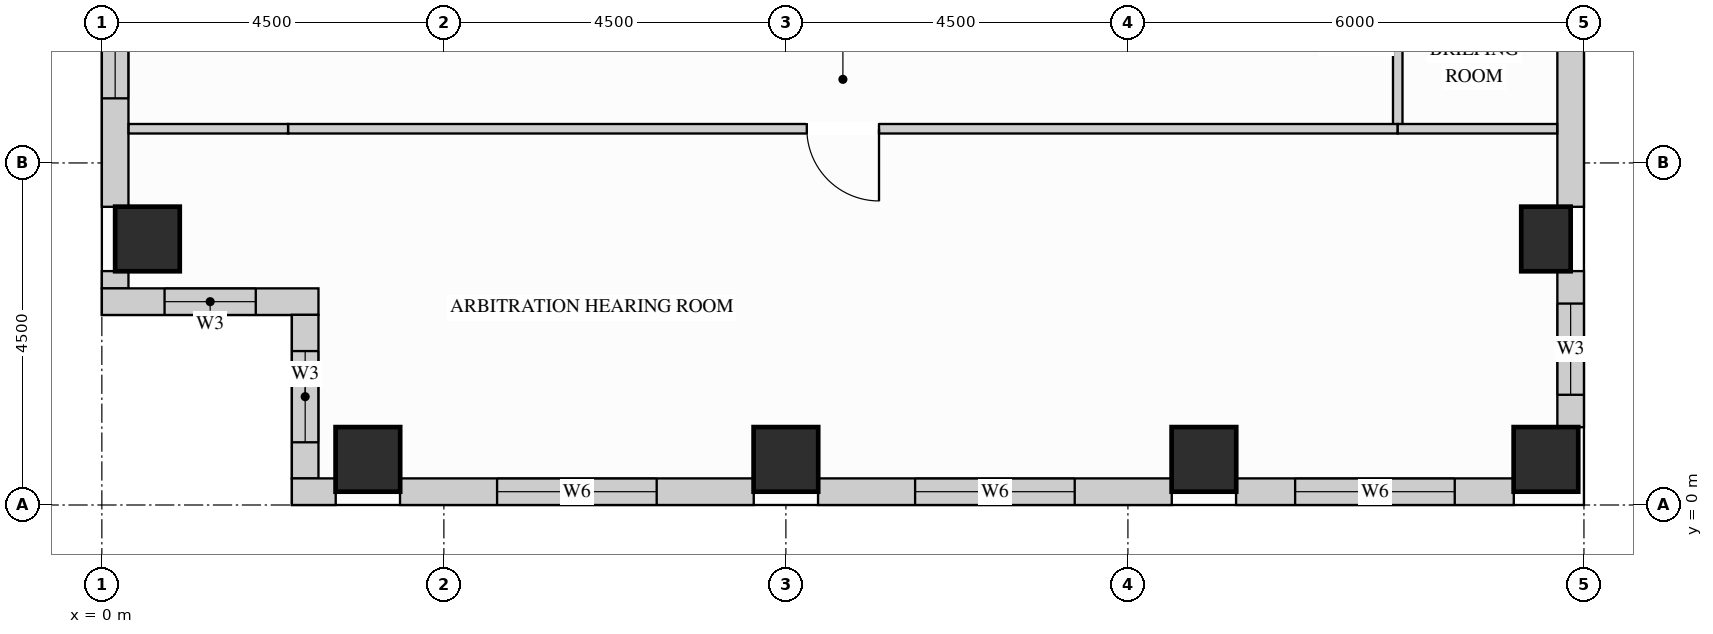
"""IFC4 building model, lengths in metres.
Left out: names, types, materials, properties, quantities, classifications, styles, units other than length and angle.
Written with IfcOpenShell. Run it as: python <this file> out.ifc"""

import sys

from ifc_helpers import new_model, si_unit, direction, frame, frame_2d, origin, origin_2d, place, context, subcontext, project, spatial, rectangle, extrude, source, transform, mapped, element, fill, save


model = new_model("IFC4")
c1 = context("Model", 3, precision=1e-05, world=origin(), true_north=direction((0.0, 1.0)))
c2 = subcontext(c1, "Body", "Model", "MODEL_VIEW")
j1 = project(units=[si_unit("LENGTHUNIT", "METRE"), si_unit("PLANEANGLEUNIT", "RADIAN")], contexts=[c1])
p1 = place(None, origin())
s1 = spatial("IfcSite", under=j1, at=p1, CompositionType="ELEMENT")
p2 = place(p1, origin())
s2 = spatial("IfcBuilding", under=s1, at=p2, CompositionType="ELEMENT")
p3 = place(p2, frame((0.0, 0.0, 244.8)))
s3 = spatial("IfcBuildingStorey", under=s2, at=p3, CompositionType="ELEMENT", Elevation=244.8)
m1 = source(origin(), c2, "Body", "SweptSolid", [
    extrude(rectangle(XDim=0.65, YDim=0.85, at=origin_2d()), origin(), (0.0, 0.0, 1.0), 3.4),
])
p4 = place(p3, frame((19.0, 3.5, 0.0), z_axis=(0.0, 0.0, 1.0), x_axis=(1.0, 0.0, 0.0)))
e1 = element("IfcColumn", 1, at=p4, inside=s3, PredefinedType="COLUMN", context=c2, shape_type="MappedRepresentation", body=[
    mapped(m1, transform((0.0, 0.0, 0.0), x_axis=(1.0, 0.0, 0.0), y_axis=(0.0, 1.0, 0.0), z_axis=(0.0, 0.0, 1.0))),
])
m2 = source(origin(), c2, "Body", "SweptSolid", [
    extrude(rectangle(XDim=0.85, YDim=0.85, at=origin_2d()), origin(), (0.0, 0.0, 1.0), 3.4),
])
for number, where, z_axis, x_axis in (
    (2, (14.5, 0.6, 0.0), (0.0, 0.0, 1.0), (1.0, 0.0, 0.0)),
    (3, (19.0, 0.6, 0.0), (0.0, 0.0, 1.0), (1.0, 0.0, 0.0)),
    (4, (3.5, 0.6, 0.0), (0.0, 0.0, 1.0), (1.0, 0.0, 0.0)),
    (5, (9.0, 0.6, 0.0), (0.0, 0.0, 1.0), (1.0, 0.0, 0.0)),
    (6, (0.6, 3.5, 0.0), (0.0, 0.0, 1.0), (1.0, 0.0, 0.0)),
):
    element("IfcColumn", number, at=place(p3, frame(where, z_axis=z_axis, x_axis=x_axis)), inside=s3, PredefinedType="COLUMN", context=c2, shape_type="MappedRepresentation", body=[
        mapped(m2, transform((0.0, 0.0, 0.0), x_axis=(1.0, 0.0, 0.0), y_axis=(0.0, 1.0, 0.0), z_axis=(0.0, 0.0, 1.0))),
    ])
p5 = place(p3, frame((0.175, 8.077, 0.0), z_axis=(0.0, 0.0, 1.0), x_axis=(0.0, -1.0, 0.0)))
e7 = element("IfcWall", 7, at=p5, inside=s3, PredefinedType="SOLIDWALL", context=c2, shape_type="SweptSolid", body=[
    extrude(rectangle(XDim=4.154, YDim=0.35, at=frame_2d((2.077, 0.0))), origin(), (0.0, 0.0, 1.0), 3.385),
])
p6 = place(p5, frame((0.627, 0.0, 0.78)))
e8 = element("IfcOpeningElement", 8, at=p6, cuts=e7, PredefinedType="OPENING", context=c2, shape_type="SweptSolid", body=[
    extrude(rectangle(XDim=2.1, YDim=2.25, at=frame_2d((1.05, 1.125))), frame((0.0, 0.185, 0.0), z_axis=(0.0, -1.0, 0.0), x_axis=(1.0, 0.0, 0.0)), (0.0, 0.0, 1.0), 0.37),
])
m3 = source(origin(), c2, "Body", "SweptSolid", [
    extrude(rectangle(XDim=0.229, YDim=0.35, at=frame_2d((0.115, 0.0))), origin(), (0.0, 0.0, 1.0), 3.385),
])
p7 = place(p3, frame((0.175, 3.077, 0.0), z_axis=(0.0, 0.0, 1.0), x_axis=(0.0, -1.0, 0.0)))
e9 = element("IfcWall", 9, at=p7, inside=s3, PredefinedType="SOLIDWALL", context=c2, shape_type="MappedRepresentation", body=[
    mapped(m3, transform((0.0, 0.0, 0.0), x_axis=(1.0, 0.0, 0.0), y_axis=(0.0, 1.0, 0.0), z_axis=(0.0, 0.0, 1.0))),
])
p8 = place(p3, frame((0.0, 2.675, 0.0), z_axis=(0.0, 0.0, 1.0), x_axis=(1.0, 0.0, 0.0)))
e10 = element("IfcWall", 10, at=p8, inside=s3, PredefinedType="SOLIDWALL", context=c2, shape_type="SweptSolid", body=[
    extrude(rectangle(XDim=2.85, YDim=0.35, at=frame_2d((1.425, 0.0))), origin(), (0.0, 0.0, 1.0), 3.385),
])
p9 = place(p8, frame((0.825, 0.0, 0.78)))
e11 = element("IfcOpeningElement", 11, at=p9, cuts=e10, PredefinedType="OPENING", context=c2, shape_type="SweptSolid", body=[
    extrude(rectangle(XDim=1.2, YDim=2.25, at=frame_2d((0.6, 1.125))), frame((0.0, 0.185, 0.0), z_axis=(0.0, -1.0, 0.0), x_axis=(1.0, 0.0, 0.0)), (0.0, 0.0, 1.0), 0.37),
])
p10 = place(p3, frame((2.675, 2.502, 0.0), z_axis=(0.0, 0.0, 1.0), x_axis=(0.0, -1.0, 0.0)))
e12 = element("IfcWall", 12, at=p10, inside=s3, PredefinedType="SOLIDWALL", context=c2, shape_type="SweptSolid", body=[
    extrude(rectangle(XDim=2.154, YDim=0.35, at=frame_2d((1.077, 0.0))), origin(), (0.0, 0.0, 1.0), 3.385),
])
p11 = place(p10, frame((0.477, 0.0, 0.78)))
e13 = element("IfcOpeningElement", 13, at=p11, cuts=e12, PredefinedType="OPENING", context=c2, shape_type="SweptSolid", body=[
    extrude(rectangle(XDim=1.2, YDim=2.25, at=frame_2d((0.6, 1.125))), frame((0.0, 0.185, 0.0), z_axis=(0.0, -1.0, 0.0), x_axis=(1.0, 0.0, 0.0)), (0.0, 0.0, 1.0), 0.37),
])
m4 = source(origin(), c2, "Body", "SweptSolid", [
    extrude(rectangle(XDim=0.577, YDim=0.35, at=frame_2d((0.289, 0.0))), origin(), (0.0, 0.0, 1.0), 3.385),
])
p12 = place(p3, frame((2.5, 0.175, 0.0), z_axis=(0.0, 0.0, 1.0), x_axis=(1.0, 0.0, 0.0)))
e14 = element("IfcWall", 14, at=p12, inside=s3, PredefinedType="SOLIDWALL", context=c2, shape_type="MappedRepresentation", body=[
    mapped(m4, transform((0.0, 0.0, 0.0), x_axis=(1.0, 0.0, 0.0), y_axis=(0.0, 1.0, 0.0), z_axis=(0.0, 0.0, 1.0))),
])
p13 = place(p3, frame((3.923, 0.175, 0.0), z_axis=(0.0, 0.0, 1.0), x_axis=(1.0, 0.0, 0.0)))
e15 = element("IfcWall", 15, at=p13, inside=s3, PredefinedType="SOLIDWALL", context=c2, shape_type="SweptSolid", body=[
    extrude(rectangle(XDim=4.654, YDim=0.35, at=frame_2d((2.327, 0.0))), origin(), (0.0, 0.0, 1.0), 3.385),
])
p14 = place(p13, frame((1.277, 0.0, 0.78)))
e16 = element("IfcOpeningElement", 16, at=p14, cuts=e15, PredefinedType="OPENING", context=c2, shape_type="SweptSolid", body=[
    extrude(rectangle(XDim=2.1, YDim=2.25, at=frame_2d((1.05, 1.125))), frame((0.0, 0.185, 0.0), z_axis=(0.0, -1.0, 0.0), x_axis=(1.0, 0.0, 0.0)), (0.0, 0.0, 1.0), 0.37),
])
p15 = place(p3, frame((9.423, 0.175, 0.0), z_axis=(0.0, 0.0, 1.0), x_axis=(1.0, 0.0, 0.0)))
e17 = element("IfcWall", 17, at=p15, inside=s3, PredefinedType="SOLIDWALL", context=c2, shape_type="SweptSolid", body=[
    extrude(rectangle(XDim=4.654, YDim=0.35, at=frame_2d((2.327, 0.0))), origin(), (0.0, 0.0, 1.0), 3.385),
])
p16 = place(p15, frame((1.277, 0.0, 0.78)))
e18 = element("IfcOpeningElement", 18, at=p16, cuts=e17, PredefinedType="OPENING", context=c2, shape_type="SweptSolid", body=[
    extrude(rectangle(XDim=2.1, YDim=2.25, at=frame_2d((1.05, 1.125))), frame((0.0, 0.185, 0.0), z_axis=(0.0, -1.0, 0.0), x_axis=(1.0, 0.0, 0.0)), (0.0, 0.0, 1.0), 0.37),
])
p17 = place(p3, frame((14.923, 0.175, 0.0), z_axis=(0.0, 0.0, 1.0), x_axis=(1.0, 0.0, 0.0)))
e19 = element("IfcWall", 19, at=p17, inside=s3, PredefinedType="SOLIDWALL", context=c2, shape_type="SweptSolid", body=[
    extrude(rectangle(XDim=3.654, YDim=0.35, at=frame_2d((1.827, 0.0))), origin(), (0.0, 0.0, 1.0), 3.385),
])
p18 = place(p17, frame((0.777, 0.0, 0.78)))
e20 = element("IfcOpeningElement", 20, at=p18, cuts=e19, PredefinedType="OPENING", context=c2, shape_type="SweptSolid", body=[
    extrude(rectangle(XDim=2.1, YDim=2.25, at=frame_2d((1.05, 1.125))), frame((0.0, 0.185, 0.0), z_axis=(0.0, -1.0, 0.0), x_axis=(1.0, 0.0, 0.0)), (0.0, 0.0, 1.0), 0.37),
])
p19 = place(p3, frame((19.325, 1.023, 0.0), z_axis=(0.0, 0.0, 1.0), x_axis=(0.0, 1.0, 0.0)))
e21 = element("IfcWall", 21, at=p19, inside=s3, PredefinedType="SOLIDWALL", context=c2, shape_type="SweptSolid", body=[
    extrude(rectangle(XDim=2.054, YDim=0.35, at=frame_2d((1.027, 0.0))), origin(), (0.0, 0.0, 1.0), 2.619),
])
p20 = place(p19, frame((0.427, 0.0, 0.78)))
e22 = element("IfcOpeningElement", 22, at=p20, cuts=e21, PredefinedType="OPENING", context=c2, shape_type="SweptSolid", body=[
    extrude(rectangle(XDim=1.2, YDim=1.659, at=frame_2d((0.6, 0.83))), frame((0.0, 0.185, 0.0), z_axis=(0.0, -1.0, 0.0), x_axis=(1.0, 0.0, 0.0)), (0.0, 0.0, 1.0), 0.37),
])
m5 = source(origin(), c2, "Body", "SweptSolid", [
    extrude(rectangle(XDim=4.154, YDim=0.35, at=frame_2d((2.077, 0.0))), origin(), (0.0, 0.0, 1.0), 2.619),
])
p21 = place(p3, frame((19.325, 3.923, 0.0), z_axis=(0.0, 0.0, 1.0), x_axis=(0.0, 1.0, 0.0)))
e23 = element("IfcWall", 23, at=p21, inside=s3, PredefinedType="SOLIDWALL", context=c2, shape_type="MappedRepresentation", body=[
    mapped(m5, transform((0.0, 0.0, 0.0), x_axis=(1.0, 0.0, 0.0), y_axis=(0.0, 1.0, 0.0), z_axis=(0.0, 0.0, 1.0))),
])
p22 = place(p3, frame((17.05, 4.95, 0.0), z_axis=(0.0, 0.0, 1.0), x_axis=(0.0, 1.0, 0.0)))
e24 = element("IfcWall", 24, at=p22, inside=s3, PredefinedType="PARTITIONING", context=c2, shape_type="SweptSolid", body=[
    extrude(rectangle(XDim=5.65, YDim=0.125, at=frame_2d((2.825, 0.0))), origin(), (0.0, 0.0, 1.0), 3.385),
])
p23 = place(p22, frame((2.35, 0.0, 0.0)))
e25 = element("IfcOpeningElement", 25, at=p23, cuts=e24, PredefinedType="OPENING", context=c2, shape_type="SweptSolid", body=[
    extrude(rectangle(XDim=0.95, YDim=2.15, at=frame_2d((0.475, 1.075))), frame((0.0, 0.073, 0.0), z_axis=(0.0, -1.0, 0.0), x_axis=(1.0, 0.0, 0.0)), (0.0, 0.0, 1.0), 0.145),
])
p24 = place(p3, frame((2.45, 4.95, 0.0), z_axis=(0.0, 0.0, 1.0), x_axis=(1.0, 0.0, 0.0)))
e26 = element("IfcWall", 26, at=p24, inside=s3, PredefinedType="PARTITIONING", context=c2, shape_type="SweptSolid", body=[
    extrude(rectangle(XDim=14.6, YDim=0.125, at=frame_2d((7.3, 0.0))), origin(), (0.0, 0.0, 1.0), 2.848),
])
p25 = place(p24, frame((6.825, 0.0, 0.0)))
e27 = element("IfcOpeningElement", 27, at=p25, cuts=e26, PredefinedType="OPENING", context=c2, shape_type="SweptSolid", body=[
    extrude(rectangle(XDim=0.95, YDim=2.15, at=frame_2d((0.475, 1.075))), frame((0.0, 0.073, 0.0), z_axis=(0.0, -1.0, 0.0), x_axis=(1.0, 0.0, 0.0)), (0.0, 0.0, 1.0), 0.145),
])
m6 = source(origin(), c2, "Body", "SweptSolid", [
    extrude(rectangle(XDim=2.098, YDim=0.125, at=frame_2d((1.049, 0.0))), origin(), (0.0, 0.0, 1.0), 2.848),
])
for number, where, z_axis, x_axis in (
    (28, (0.352, 4.95, 0.0), (0.0, 0.0, 1.0), (1.0, 0.0, 0.0)),
    (29, (17.05, 4.95, 0.0), (0.0, 0.0, 1.0), (1.0, 0.0, 0.0)),
):
    element("IfcWall", number, at=place(p3, frame(where, z_axis=z_axis, x_axis=x_axis)), inside=s3, PredefinedType="PARTITIONING", context=c2, shape_type="MappedRepresentation", body=[
        mapped(m6, transform((0.0, 0.0, 0.0), x_axis=(1.0, 0.0, 0.0), y_axis=(0.0, 1.0, 0.0), z_axis=(0.0, 0.0, 1.0))),
    ])
m7 = source(origin(), c2, "Body", "SweptSolid", [
    extrude(rectangle(XDim=0.95, YDim=2.15, at=frame_2d((0.475, 1.075))), frame((0.0, 0.025, 0.0), z_axis=(0.0, -1.0, 0.0), x_axis=(1.0, 0.0, 0.0)), (0.0, 0.0, 1.0), 0.05),
])
p26 = place(p25, origin())
e30 = element("IfcDoor", 30, at=p26, inside=s3, OperationType="SINGLE_SWING_RIGHT", PredefinedType="DOOR", context=c2, shape_type="MappedRepresentation", body=[
    mapped(m7, transform((0.0, 0.0, 0.0), x_axis=(1.0, 0.0, 0.0), y_axis=(0.0, 1.0, 0.0), z_axis=(0.0, 0.0, 1.0))),
])
fill(e27, e30)
m8 = source(origin(), c2, "Body", "SweptSolid", [
    extrude(rectangle(XDim=1.2, YDim=2.25, at=frame_2d((0.6, 1.125))), frame((0.0, 0.03, 0.0), z_axis=(0.0, -1.0, 0.0), x_axis=(1.0, 0.0, 0.0)), (0.0, 0.0, 1.0), 0.06),
])
p27 = place(p9, origin())
e31 = element("IfcWindow", 31, at=p27, inside=s3, PartitioningType="SINGLE_PANEL", PredefinedType="WINDOW", context=c2, shape_type="MappedRepresentation", body=[
    mapped(m8, transform((0.0, 0.0, 0.0), x_axis=(1.0, 0.0, 0.0), y_axis=(0.0, 1.0, 0.0), z_axis=(0.0, 0.0, 1.0))),
])
fill(e11, e31)
p28 = place(p11, origin())
e32 = element("IfcWindow", 32, at=p28, inside=s3, PartitioningType="SINGLE_PANEL", PredefinedType="WINDOW", context=c2, shape_type="MappedRepresentation", body=[
    mapped(m8, transform((0.0, 0.0, 0.0), x_axis=(1.0, 0.0, 0.0), y_axis=(0.0, 1.0, 0.0), z_axis=(0.0, 0.0, 1.0))),
])
fill(e13, e32)
m9 = source(origin(), c2, "Body", "SweptSolid", [
    extrude(rectangle(XDim=1.2, YDim=1.659, at=frame_2d((0.6, 0.83))), frame((0.0, 0.03, 0.0), z_axis=(0.0, -1.0, 0.0), x_axis=(1.0, 0.0, 0.0)), (0.0, 0.0, 1.0), 0.06),
])
p29 = place(p20, origin())
e33 = element("IfcWindow", 33, at=p29, inside=s3, PartitioningType="SINGLE_PANEL", PredefinedType="WINDOW", context=c2, shape_type="MappedRepresentation", body=[
    mapped(m9, transform((0.0, 0.0, 0.0), x_axis=(1.0, 0.0, 0.0), y_axis=(0.0, 1.0, 0.0), z_axis=(0.0, 0.0, 1.0))),
])
fill(e22, e33)
m10 = source(origin(), c2, "Body", "SweptSolid", [
    extrude(rectangle(XDim=2.1, YDim=2.25, at=frame_2d((1.05, 1.125))), frame((0.0, 0.03, 0.0), z_axis=(0.0, -1.0, 0.0), x_axis=(1.0, 0.0, 0.0)), (0.0, 0.0, 1.0), 0.06),
])
p30 = place(p6, origin())
e34 = element("IfcWindow", 34, at=p30, inside=s3, PartitioningType="SINGLE_PANEL", PredefinedType="WINDOW", context=c2, shape_type="MappedRepresentation", body=[
    mapped(m10, transform((0.0, 0.0, 0.0), x_axis=(1.0, 0.0, 0.0), y_axis=(0.0, 1.0, 0.0), z_axis=(0.0, 0.0, 1.0))),
])
fill(e8, e34)
p31 = place(p14, origin())
e35 = element("IfcWindow", 35, at=p31, inside=s3, PartitioningType="SINGLE_PANEL", PredefinedType="WINDOW", context=c2, shape_type="MappedRepresentation", body=[
    mapped(m10, transform((0.0, 0.0, 0.0), x_axis=(1.0, 0.0, 0.0), y_axis=(0.0, 1.0, 0.0), z_axis=(0.0, 0.0, 1.0))),
])
fill(e16, e35)
p32 = place(p16, origin())
e36 = element("IfcWindow", 36, at=p32, inside=s3, PartitioningType="SINGLE_PANEL", PredefinedType="WINDOW", context=c2, shape_type="MappedRepresentation", body=[
    mapped(m10, transform((0.0, 0.0, 0.0), x_axis=(1.0, 0.0, 0.0), y_axis=(0.0, 1.0, 0.0), z_axis=(0.0, 0.0, 1.0))),
])
fill(e18, e36)
p33 = place(p18, origin())
e37 = element("IfcWindow", 37, at=p33, inside=s3, PartitioningType="SINGLE_PANEL", PredefinedType="WINDOW", context=c2, shape_type="MappedRepresentation", body=[
    mapped(m10, transform((0.0, 0.0, 0.0), x_axis=(1.0, 0.0, 0.0), y_axis=(0.0, 1.0, 0.0), z_axis=(0.0, 0.0, 1.0))),
])
fill(e20, e37)
save(model, sys.argv[1])
